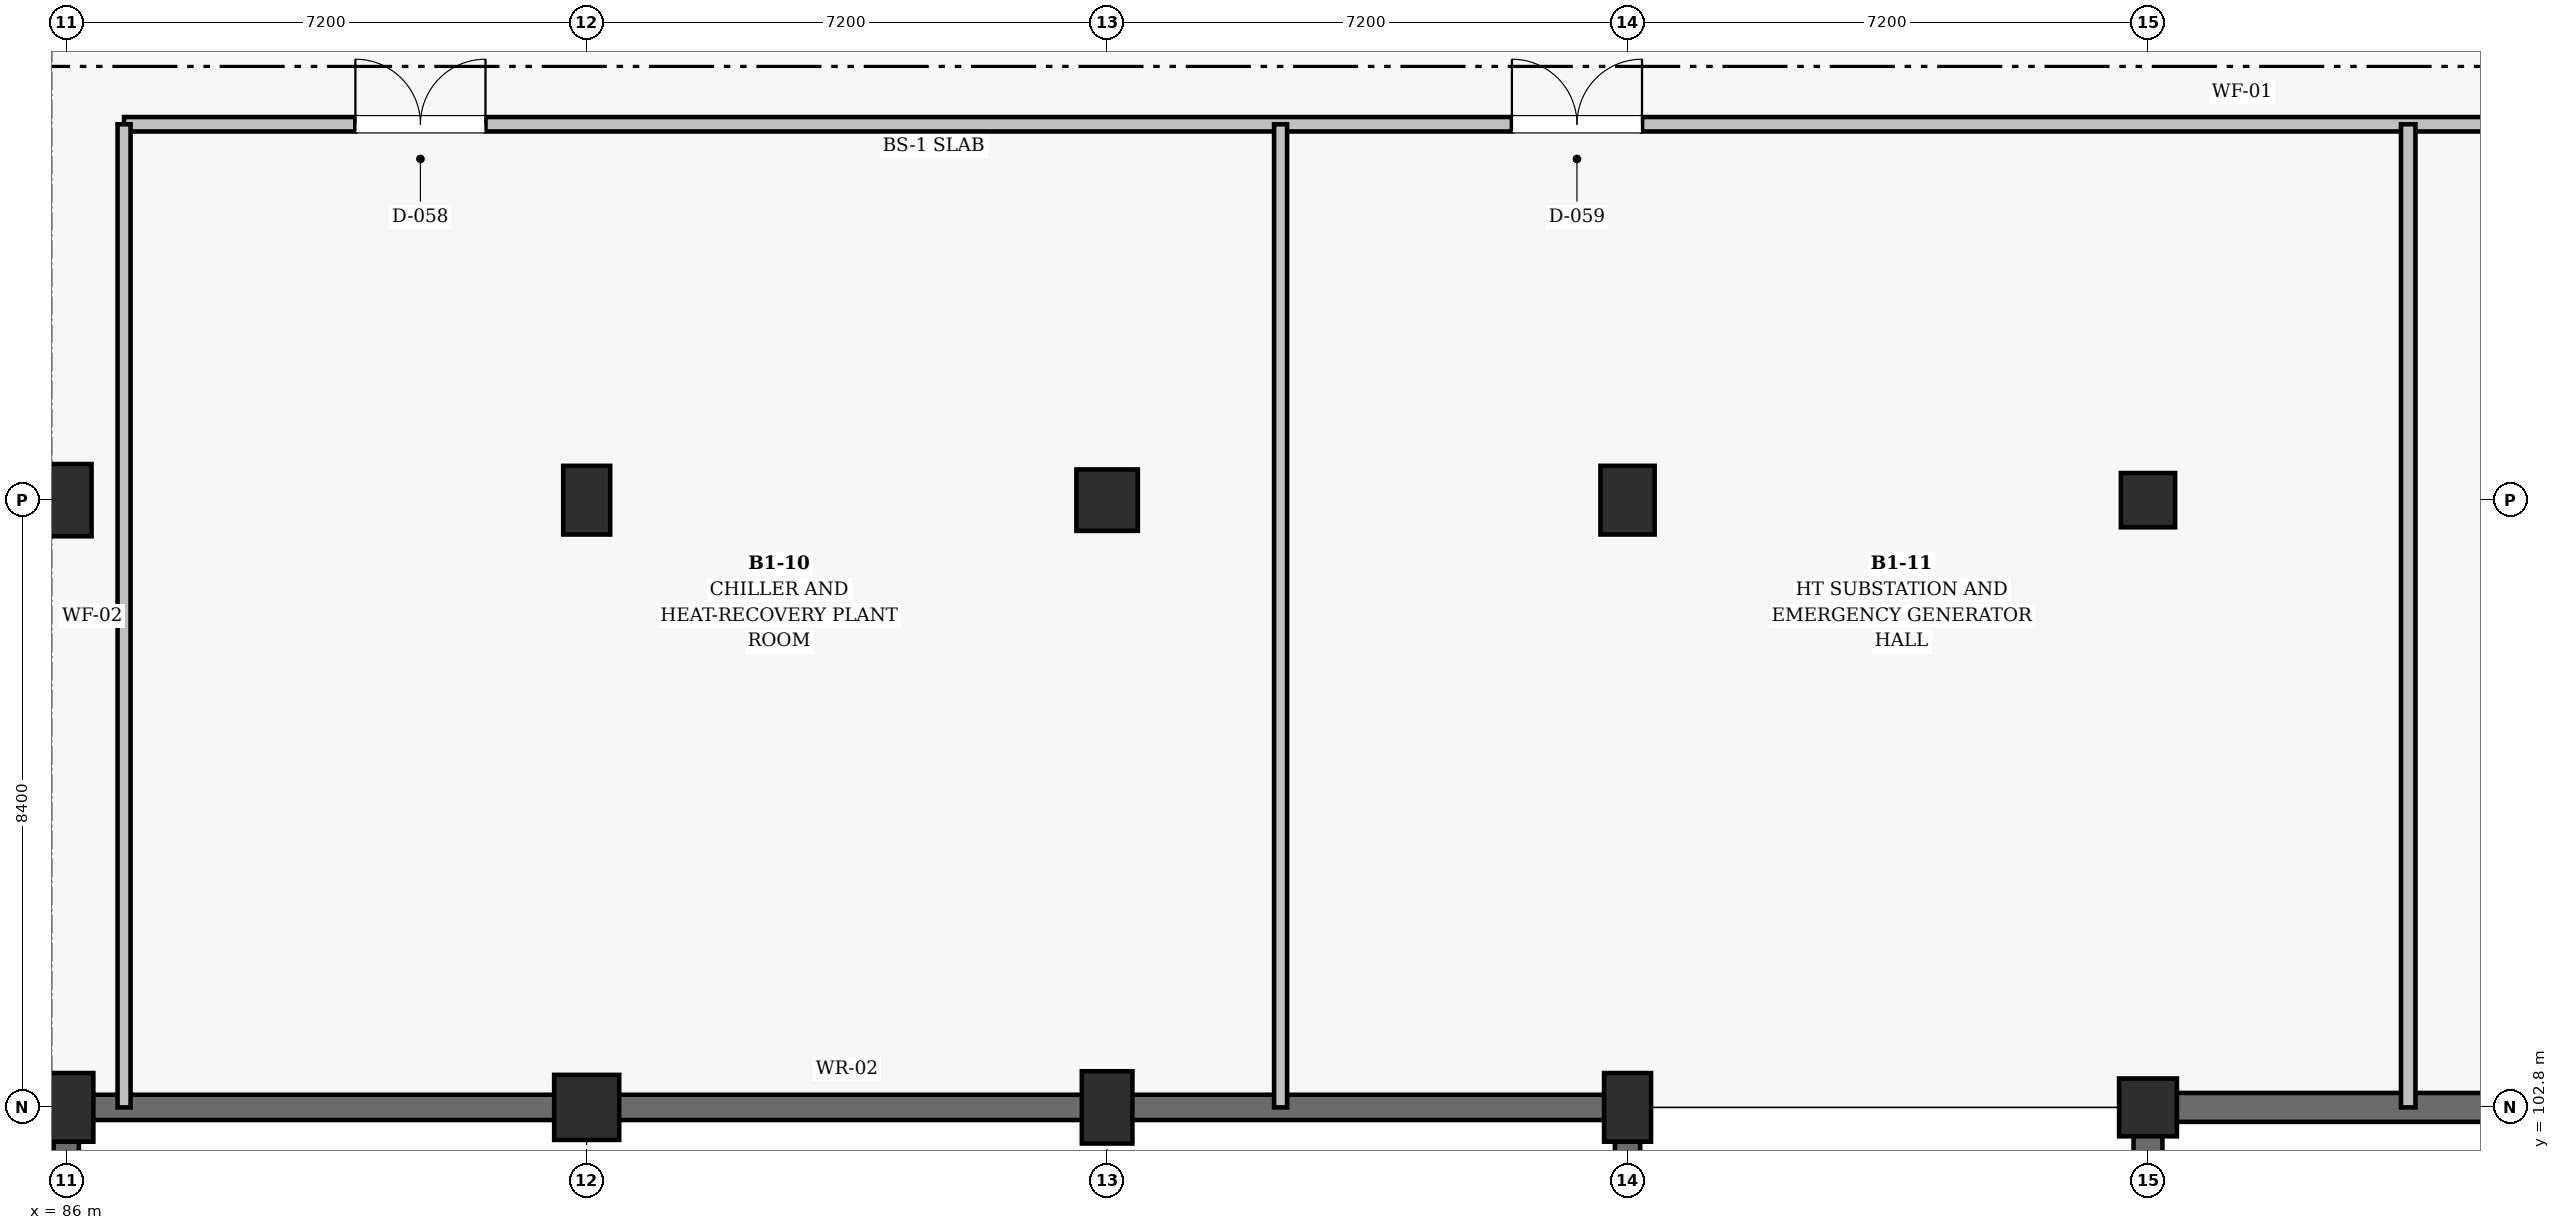
"""IFC4 building model, lengths in metres.
Left out: names, types, materials, properties, quantities, classifications, styles, units other than length and angle.
Written with IfcOpenShell. Run it as: python <this file> out.ifc"""

import sys

from ifc_helpers import new_model, si_unit, direction, frame, frame_2d, origin, origin_2d, place, context, subcontext, project, spatial, rectangle, extrude, element, fill, save


model = new_model("IFC4")
c1 = context("Model", 3, precision=1e-05, world=origin(), true_north=direction((0.0, 1.0)))
c2 = subcontext(c1, "Body", "Model", "MODEL_VIEW")
j1 = project(units=[si_unit("LENGTHUNIT", "METRE"), si_unit("PLANEANGLEUNIT", "RADIAN")], contexts=[c1])
p1 = place(None, origin())
s1 = spatial("IfcSite", under=j1, at=p1, CompositionType="ELEMENT")
p2 = place(p1, origin())
s2 = spatial("IfcBuilding", under=s1, at=p2, CompositionType="ELEMENT")
p3 = place(p2, frame((0.0, 0.0, -4.5)))
s3 = spatial("IfcBuildingStorey", under=s2, at=p3, CompositionType="ELEMENT", Elevation=-4.5)
p4 = place(p3, frame((86.0, 102.8, 0.0), z_axis=(0.0, 0.0, 1.0), x_axis=(1.0, 0.0, 0.0)))
e1 = element("IfcColumn", 1, at=p4, inside=s3, PredefinedType="COLUMN", context=c2, shape_type="SweptSolid", body=[
    extrude(rectangle(XDim=0.75, YDim=0.95, at=origin_2d()), origin(), (0.0, 0.0, 1.0), 4.5),
])
p5 = place(p3, frame((86.0, 111.2, 0.0), z_axis=(0.0, 0.0, 1.0), x_axis=(1.0, 0.0, 0.0)))
e2 = element("IfcColumn", 2, at=p5, inside=s3, PredefinedType="COLUMN", context=c2, shape_type="SweptSolid", body=[
    extrude(rectangle(XDim=0.7, YDim=1.0, at=origin_2d()), origin(), (0.0, 0.0, 1.0), 4.5),
])
p6 = place(p3, frame((93.2, 102.8, 0.0), z_axis=(0.0, 0.0, 1.0), x_axis=(1.0, 0.0, 0.0)))
e3 = element("IfcColumn", 3, at=p6, inside=s3, PredefinedType="COLUMN", context=c2, shape_type="SweptSolid", body=[
    extrude(rectangle(XDim=0.9, YDim=0.9, at=origin_2d()), origin(), (0.0, 0.0, 1.0), 4.5),
])
p7 = place(p3, frame((93.2, 111.2, 0.0), z_axis=(0.0, 0.0, 1.0), x_axis=(1.0, 0.0, 0.0)))
e4 = element("IfcColumn", 4, at=p7, inside=s3, PredefinedType="COLUMN", context=c2, shape_type="SweptSolid", body=[
    extrude(rectangle(XDim=0.65, YDim=0.95, at=origin_2d()), origin(), (0.0, 0.0, 1.0), 4.5),
])
p8 = place(p3, frame((100.4, 102.8, 0.0), z_axis=(0.0, 0.0, 1.0), x_axis=(1.0, 0.0, 0.0)))
e5 = element("IfcColumn", 5, at=p8, inside=s3, PredefinedType="COLUMN", context=c2, shape_type="SweptSolid", body=[
    extrude(rectangle(XDim=0.7, YDim=1.0, at=origin_2d()), origin(), (0.0, 0.0, 1.0), 4.5),
])
p9 = place(p3, frame((100.4, 111.2, 0.0), z_axis=(0.0, 0.0, 1.0), x_axis=(1.0, 0.0, 0.0)))
e6 = element("IfcColumn", 6, at=p9, inside=s3, PredefinedType="COLUMN", context=c2, shape_type="SweptSolid", body=[
    extrude(rectangle(XDim=0.85, YDim=0.85, at=origin_2d()), origin(), (0.0, 0.0, 1.0), 4.5),
])
p10 = place(p3, frame((107.6, 102.8, 0.0), z_axis=(0.0, 0.0, 1.0), x_axis=(1.0, 0.0, 0.0)))
e7 = element("IfcColumn", 7, at=p10, inside=s3, PredefinedType="COLUMN", context=c2, shape_type="SweptSolid", body=[
    extrude(rectangle(XDim=0.65, YDim=0.95, at=origin_2d()), origin(), (0.0, 0.0, 1.0), 4.5),
])
p11 = place(p3, frame((107.6, 111.2, 0.0), z_axis=(0.0, 0.0, 1.0), x_axis=(1.0, 0.0, 0.0)))
e8 = element("IfcColumn", 8, at=p11, inside=s3, PredefinedType="COLUMN", context=c2, shape_type="SweptSolid", body=[
    extrude(rectangle(XDim=0.75, YDim=0.95, at=origin_2d()), origin(), (0.0, 0.0, 1.0), 4.5),
])
p12 = place(p3, frame((114.8, 102.8, 0.0), z_axis=(0.0, 0.0, 1.0), x_axis=(1.0, 0.0, 0.0)))
e9 = element("IfcColumn", 9, at=p12, inside=s3, PredefinedType="COLUMN", context=c2, shape_type="SweptSolid", body=[
    extrude(rectangle(XDim=0.8, YDim=0.8, at=origin_2d()), origin(), (0.0, 0.0, 1.0), 4.5),
])
p13 = place(p3, frame((114.8, 111.2, 0.0), z_axis=(0.0, 0.0, 1.0), x_axis=(1.0, 0.0, 0.0)))
e10 = element("IfcColumn", 10, at=p13, inside=s3, PredefinedType="COLUMN", context=c2, shape_type="SweptSolid", body=[
    extrude(rectangle(XDim=0.75, YDim=0.75, at=origin_2d()), origin(), (0.0, 0.0, 1.0), 4.5),
])
for number, where, z_axis, x_axis in (
    (11, (114.8, 102.8, 0.0), (0.0, 0.0, 1.0), (1.0, 0.0, 0.0)),
    (12, (114.8, 35.6, 0.0), (0.0, 0.0, 1.0), (0.0, 1.0, 0.0)),
):
    element("IfcWall", number, at=place(p3, frame(where, z_axis=z_axis, x_axis=x_axis)), inside=s3, PredefinedType="USERDEFINED", context=c2, shape_type="SweptSolid", body=[
        extrude(rectangle(XDim=67.2, YDim=0.4, at=frame_2d((33.6, 0.0))), origin(), (0.0, 0.0, 1.0), 4.16),
    ])
p14 = place(p3, frame((107.6, 35.6, 0.0), z_axis=(0.0, 0.0, 1.0), x_axis=(0.0, 1.0, 0.0)))
e13 = element("IfcWall", 13, at=p14, inside=s3, PredefinedType="USERDEFINED", context=c2, shape_type="SweptSolid", body=[
    extrude(rectangle(XDim=67.2, YDim=0.35, at=frame_2d((33.6, 0.0))), origin(), (0.0, 0.0, 1.0), 4.16),
])
p15 = place(p3, frame((86.0, 102.8, 0.0), z_axis=(0.0, 0.0, 1.0), x_axis=(1.0, 0.0, 0.0)))
e14 = element("IfcWall", 14, at=p15, inside=s3, PredefinedType="USERDEFINED", context=c2, shape_type="SweptSolid", body=[
    extrude(rectangle(XDim=21.6, YDim=0.35, at=frame_2d((10.8, 0.0))), origin(), (0.0, 0.0, 1.0), 4.16),
])
p16 = place(p3, frame((86.0, 64.4, 0.0), z_axis=(0.0, 0.0, 1.0), x_axis=(0.0, 1.0, 0.0)))
e15 = element("IfcWall", 15, at=p16, inside=s3, PredefinedType="USERDEFINED", context=c2, shape_type="SweptSolid", body=[
    extrude(rectangle(XDim=38.4, YDim=0.35, at=frame_2d((19.2, 0.0))), origin(), (0.0, 0.0, 1.0), 4.16),
])
p17 = place(p3, frame((86.8, 116.4, 0.0), z_axis=(0.0, 0.0, 1.0), x_axis=(1.0, 0.0, 0.0)))
e16 = element("IfcWall", 16, at=p17, inside=s3, PredefinedType="SOLIDWALL", context=c2, shape_type="SweptSolid", body=[
    extrude(rectangle(XDim=58.6, YDim=0.2, at=frame_2d((29.3, 0.0))), origin(), (0.0, 0.0, 1.0), 2.92),
])
p18 = place(p17, frame((3.2, 0.0, 0.0)))
e17 = element("IfcOpeningElement", 17, at=p18, cuts=e16, PredefinedType="OPENING", context=c2, shape_type="SweptSolid", body=[
    extrude(rectangle(XDim=1.8, YDim=2.25, at=frame_2d((0.9, 1.125))), frame((0.0, 0.11, 0.0), z_axis=(0.0, -1.0, 0.0), x_axis=(1.0, 0.0, 0.0)), (0.0, 0.0, 1.0), 0.22),
])
p19 = place(p17, frame((19.2, 0.0, 0.0)))
e18 = element("IfcOpeningElement", 18, at=p19, cuts=e16, PredefinedType="OPENING", context=c2, shape_type="SweptSolid", body=[
    extrude(rectangle(XDim=1.8, YDim=2.25, at=frame_2d((0.9, 1.125))), frame((0.0, 0.11, 0.0), z_axis=(0.0, -1.0, 0.0), x_axis=(1.0, 0.0, 0.0)), (0.0, 0.0, 1.0), 0.22),
])
p20 = place(p17, frame((34.8, 0.0, 0.0)))
e19 = element("IfcOpeningElement", 19, at=p20, cuts=e16, PredefinedType="OPENING", context=c2, shape_type="SweptSolid", body=[
    extrude(rectangle(XDim=1.8, YDim=2.25, at=frame_2d((0.9, 1.125))), frame((0.0, 0.11, 0.0), z_axis=(0.0, -1.0, 0.0), x_axis=(1.0, 0.0, 0.0)), (0.0, 0.0, 1.0), 0.22),
])
p21 = place(p17, frame((52.2, 0.0, 0.0)))
e20 = element("IfcOpeningElement", 20, at=p21, cuts=e16, PredefinedType="OPENING", context=c2, shape_type="SweptSolid", body=[
    extrude(rectangle(XDim=1.8, YDim=2.25, at=frame_2d((0.9, 1.125))), frame((0.0, 0.11, 0.0), z_axis=(0.0, -1.0, 0.0), x_axis=(1.0, 0.0, 0.0)), (0.0, 0.0, 1.0), 0.22),
])
p22 = place(p3, frame((86.8, 102.8, 0.0), z_axis=(0.0, 0.0, 1.0), x_axis=(0.0, 1.0, 0.0)))
e21 = element("IfcWall", 21, at=p22, inside=s3, PredefinedType="SOLIDWALL", context=c2, shape_type="SweptSolid", body=[
    extrude(rectangle(XDim=13.6, YDim=0.18, at=frame_2d((6.8, 0.0))), origin(), (0.0, 0.0, 1.0), 3.44),
])
p23 = place(p3, frame((102.8, 102.8, 0.0), z_axis=(0.0, 0.0, 1.0), x_axis=(0.0, 1.0, 0.0)))
e22 = element("IfcWall", 22, at=p23, inside=s3, PredefinedType="SOLIDWALL", context=c2, shape_type="SweptSolid", body=[
    extrude(rectangle(XDim=13.6, YDim=0.18, at=frame_2d((6.8, 0.0))), origin(), (0.0, 0.0, 1.0), 3.41),
])
p24 = place(p3, frame((118.4, 102.8, 0.0), z_axis=(0.0, 0.0, 1.0), x_axis=(0.0, 1.0, 0.0)))
e23 = element("IfcWall", 23, at=p24, inside=s3, PredefinedType="SOLIDWALL", context=c2, shape_type="SweptSolid", body=[
    extrude(rectangle(XDim=13.6, YDim=0.2, at=frame_2d((6.8, 0.0))), origin(), (0.0, 0.0, 1.0), 3.42),
])
p25 = place(p18, origin())
e24 = element("IfcDoor", 24, at=p25, inside=s3, OperationType="DOUBLE_DOOR_SINGLE_SWING", PredefinedType="DOOR", context=c2, shape_type="SweptSolid", body=[
    extrude(rectangle(XDim=1.8, YDim=2.25, at=frame_2d((0.9, 1.125))), frame((0.0, 0.025, 0.0), z_axis=(0.0, -1.0, 0.0), x_axis=(1.0, 0.0, 0.0)), (0.0, 0.0, 1.0), 0.05),
])
fill(e17, e24)
p26 = place(p19, origin())
e25 = element("IfcDoor", 25, at=p26, inside=s3, OperationType="DOUBLE_DOOR_SINGLE_SWING", PredefinedType="DOOR", context=c2, shape_type="SweptSolid", body=[
    extrude(rectangle(XDim=1.8, YDim=2.25, at=frame_2d((0.9, 1.125))), frame((0.0, 0.025, 0.0), z_axis=(0.0, -1.0, 0.0), x_axis=(1.0, 0.0, 0.0)), (0.0, 0.0, 1.0), 0.05),
])
fill(e18, e25)
save(model, sys.argv[1])
